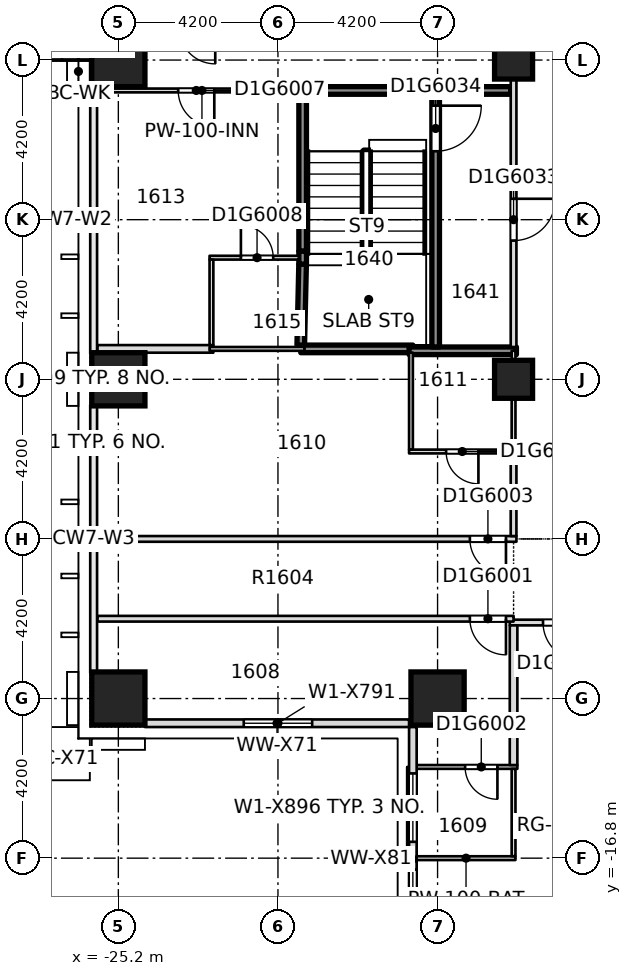
"""IFC4 building model, lengths in metres.
Left out: names, types, materials, properties, quantities, classifications, styles, units other than length and angle.
Written with IfcOpenShell. Run it as: python <this file> out.ifc"""

import sys

from ifc_helpers import new_model, si_unit, direction, frame, frame_2d, origin, origin_2d, place, context, subcontext, project, spatial, rectangle, extrude, element, fill, save


model = new_model("IFC4")
c1 = context("Model", 3, precision=1e-05, world=origin(), true_north=direction((0.0, 1.0)))
c2 = subcontext(c1, "Body", "Model", "MODEL_VIEW")
j1 = project(units=[si_unit("LENGTHUNIT", "METRE"), si_unit("PLANEANGLEUNIT", "RADIAN")], contexts=[c1])
p1 = place(None, origin())
s1 = spatial("IfcSite", under=j1, at=p1, CompositionType="ELEMENT")
p2 = place(p1, origin())
s2 = spatial("IfcBuilding", under=s1, at=p2, CompositionType="ELEMENT")
p3 = place(p2, frame((0.0, 0.0, 69.0)))
s3 = spatial("IfcBuildingStorey", under=s2, at=p3, CompositionType="ELEMENT", Elevation=69.0)
for number, where, z_axis, x_axis in (
    (1, (-25.2, -12.6, -0.32), (0.0, 0.0, 1.0), (1.0, 0.0, 0.0)),
    (2, (-16.8, -12.6, -0.32), (0.0, 0.0, 1.0), (1.0, 0.0, 0.0)),
    (3, (-25.2, -4.2, -0.32), (0.0, 0.0, 1.0), (1.0, 0.0, 0.0)),
    (4, (-25.2, 4.2, -0.32), (0.0, 0.0, 1.0), (1.0, 0.0, 0.0)),
):
    element("IfcColumn", number, at=place(p3, frame(where, z_axis=z_axis, x_axis=x_axis)), inside=s3, PredefinedType="COLUMN", context=c2, shape_type="SweptSolid", body=[
        extrude(rectangle(XDim=1.4, YDim=1.4, at=origin_2d()), origin(), (0.0, 0.0, 1.0), 3.45),
    ])
for number, where, z_axis, x_axis in (
    (5, (-14.8, -4.2, -0.32), (0.0, 0.0, 1.0), (1.0, 0.0, 0.0)),
    (6, (-14.8, 4.2, -0.32), (0.0, 0.0, 1.0), (1.0, 0.0, 0.0)),
):
    element("IfcColumn", number, at=place(p3, frame(where, z_axis=z_axis, x_axis=x_axis)), inside=s3, PredefinedType="COLUMN", context=c2, shape_type="SweptSolid", body=[
        extrude(rectangle(XDim=1.0, YDim=1.0, at=origin_2d()), origin(), (0.0, 0.0, 1.0), 3.45),
    ])
p4 = place(p3, frame((-17.35, -16.8, 0.0), z_axis=(0.0, 0.0, 1.0), x_axis=(1.0, 0.0, 0.0)))
e7 = element("IfcWall", 7, at=p4, inside=s3, PredefinedType="PARTITIONING", context=c2, shape_type="SweptSolid", body=[
    extrude(rectangle(XDim=2.598, YDim=0.1, at=frame_2d((1.299, 0.0))), origin(), (0.0, 0.0, 1.0), 3.13),
])
p5 = place(p3, frame((-17.35, -14.4, 0.0), z_axis=(0.0, 0.0, 1.0), x_axis=(1.0, 0.0, 0.0)))
e8 = element("IfcWall", 8, at=p5, inside=s3, PredefinedType="PARTITIONING", context=c2, shape_type="SweptSolid", body=[
    extrude(rectangle(XDim=2.65, YDim=0.1, at=frame_2d((1.325, 0.0))), origin(), (0.0, 0.0, 1.0), 3.13),
])
p6 = place(p5, frame((1.275, 0.0, 0.0)))
e9 = element("IfcOpeningElement", 9, at=p6, cuts=e8, PredefinedType="OPENING", context=c2, shape_type="SweptSolid", body=[
    extrude(rectangle(XDim=0.85, YDim=2.1, at=frame_2d((0.425, 1.05))), frame((0.0, 0.06, 0.0), z_axis=(0.0, -1.0, 0.0), x_axis=(1.0, 0.0, 0.0)), (0.0, 0.0, 1.0), 0.12),
])
p7 = place(p3, frame((-14.9, -10.6, 0.0), z_axis=(0.0, 0.0, 1.0), x_axis=(1.0, 0.0, 0.0)))
e10 = element("IfcWall", 10, at=p7, inside=s3, PredefinedType="PARTITIONING", context=c2, shape_type="SweptSolid", body=[
    extrude(rectangle(XDim=6.4, YDim=0.15, at=frame_2d((3.2, 0.0))), origin(), (0.0, 0.0, 1.0), 3.13),
])
p8 = place(p7, frame((3.95, 0.0, 0.0)))
e11 = element("IfcOpeningElement", 11, at=p8, cuts=e10, PredefinedType="OPENING", context=c2, shape_type="SweptSolid", body=[
    extrude(rectangle(XDim=1.1, YDim=2.1, at=frame_2d((0.55, 1.05))), frame((0.0, 0.085, 0.0), z_axis=(0.0, -1.0, 0.0), x_axis=(1.0, 0.0, 0.0)), (0.0, 0.0, 1.0), 0.17),
])
p9 = place(p7, frame((0.875, 0.0, 0.0)))
e12 = element("IfcOpeningElement", 12, at=p9, cuts=e10, PredefinedType="OPENING", context=c2, shape_type="SweptSolid", body=[
    extrude(rectangle(XDim=1.0, YDim=2.1, at=frame_2d((0.5, 1.05))), frame((0.0, 0.085, 0.0), z_axis=(0.0, -1.0, 0.0), x_axis=(1.0, 0.0, 0.0)), (0.0, 0.0, 1.0), 0.17),
])
p10 = place(p3, frame((-25.75, -10.5, 0.0), z_axis=(0.0, 0.0, 1.0), x_axis=(1.0, 0.0, 0.0)))
e13 = element("IfcWall", 13, at=p10, inside=s3, PredefinedType="PARTITIONING", context=c2, shape_type="SweptSolid", body=[
    extrude(rectangle(XDim=10.95, YDim=0.15, at=frame_2d((5.475, 0.0))), origin(), (0.0, 0.0, 1.0), 3.13),
])
p11 = place(p10, frame((9.8, 0.0, 0.0)))
e14 = element("IfcOpeningElement", 14, at=p11, cuts=e13, PredefinedType="OPENING", context=c2, shape_type="SweptSolid", body=[
    extrude(rectangle(XDim=0.95, YDim=2.1, at=frame_2d((0.475, 1.05))), frame((0.0, 0.085, 0.0), z_axis=(0.0, -1.0, 0.0), x_axis=(1.0, 0.0, 0.0)), (0.0, 0.0, 1.0), 0.17),
])
p12 = place(p3, frame((-25.75, -8.4, 0.0), z_axis=(0.0, 0.0, 1.0), x_axis=(1.0, 0.0, 0.0)))
e15 = element("IfcWall", 15, at=p12, inside=s3, PredefinedType="PARTITIONING", context=c2, shape_type="SweptSolid", body=[
    extrude(rectangle(XDim=11.025, YDim=0.15, at=frame_2d((5.512, 0.0))), origin(), (0.0, 0.0, 1.0), 3.13),
])
p13 = place(p12, frame((9.8, 0.0, 0.0)))
e16 = element("IfcOpeningElement", 16, at=p13, cuts=e15, PredefinedType="OPENING", context=c2, shape_type="SweptSolid", body=[
    extrude(rectangle(XDim=0.95, YDim=2.1, at=frame_2d((0.475, 1.05))), frame((0.0, 0.085, 0.0), z_axis=(0.0, -1.0, 0.0), x_axis=(1.0, 0.0, 0.0)), (0.0, 0.0, 1.0), 0.17),
])
p14 = place(p3, frame((-17.55, -6.1, 0.0), z_axis=(0.0, 0.0, 1.0), x_axis=(1.0, 0.0, 0.0)))
e17 = element("IfcWall", 17, at=p14, inside=s3, PredefinedType="PARTITIONING", context=c2, shape_type="SweptSolid", body=[
    extrude(rectangle(XDim=2.825, YDim=0.1, at=frame_2d((1.413, 0.0))), origin(), (0.0, 0.0, 1.0), 3.13),
])
p15 = place(p14, frame((0.975, 0.0, 0.0)))
e18 = element("IfcOpeningElement", 18, at=p15, cuts=e17, PredefinedType="OPENING", context=c2, shape_type="SweptSolid", body=[
    extrude(rectangle(XDim=0.85, YDim=2.1, at=frame_2d((0.425, 1.05))), frame((0.0, 0.06, 0.0), z_axis=(0.0, -1.0, 0.0), x_axis=(1.0, 0.0, 0.0)), (0.0, 0.0, 1.0), 0.12),
])
p16 = place(p3, frame((-25.75, -3.4, 0.0), z_axis=(0.0, 0.0, 1.0), x_axis=(1.0, 0.0, 0.0)))
e19 = element("IfcWall", 19, at=p16, inside=s3, PredefinedType="PARTITIONING", context=c2, shape_type="SweptSolid", body=[
    extrude(rectangle(XDim=3.05, YDim=0.2, at=frame_2d((1.525, 0.0))), origin(), (0.0, 0.0, 1.0), 3.13),
])
p17 = place(p3, frame((-22.8, -3.4, 0.0), z_axis=(0.0, 0.0, 1.0), x_axis=(1.0, 0.0, 0.0)))
e20 = element("IfcWall", 20, at=p17, inside=s3, PredefinedType="PARTITIONING", context=c2, shape_type="SweptSolid", body=[
    extrude(rectangle(XDim=2.5, YDim=0.1, at=frame_2d((1.25, 0.0))), origin(), (0.0, 0.0, 1.0), 3.13),
])
p18 = place(p3, frame((-20.4, -3.4, 0.0), z_axis=(0.0, 0.0, 1.0), x_axis=(1.0, 0.0, 0.0)))
e21 = element("IfcWall", 21, at=p18, inside=s3, PredefinedType="SOLIDWALL", context=c2, shape_type="SweptSolid", body=[
    extrude(rectangle(XDim=2.95, YDim=0.2, at=frame_2d((1.475, 0.0))), origin(), (0.0, 0.0, 1.0), 3.13),
])
p19 = place(p3, frame((-17.55, -3.45, 0.0), z_axis=(0.0, 0.0, 1.0), x_axis=(1.0, 0.0, 0.0)))
e22 = element("IfcWall", 22, at=p19, inside=s3, PredefinedType="SOLIDWALL", context=c2, shape_type="SweptSolid", body=[
    extrude(rectangle(XDim=2.825, YDim=0.2, at=frame_2d((1.413, 0.0))), origin(), (0.0, 0.0, 1.0), 3.13),
])
p20 = place(p3, frame((-22.8, -1.0, 0.0), z_axis=(0.0, 0.0, 1.0), x_axis=(1.0, 0.0, 0.0)))
e23 = element("IfcWall", 23, at=p20, inside=s3, PredefinedType="PARTITIONING", context=c2, shape_type="SweptSolid", body=[
    extrude(rectangle(XDim=2.35, YDim=0.1, at=frame_2d((1.175, 0.0))), origin(), (0.0, 0.0, 1.0), 3.13),
])
p21 = place(p20, frame((0.825, 0.0, 0.0)))
e24 = element("IfcOpeningElement", 24, at=p21, cuts=e23, PredefinedType="OPENING", context=c2, shape_type="SweptSolid", body=[
    extrude(rectangle(XDim=0.85, YDim=2.1, at=frame_2d((0.425, 1.05))), frame((0.0, 0.06, 0.0), z_axis=(0.0, -1.0, 0.0), x_axis=(1.0, 0.0, 0.0)), (0.0, 0.0, 1.0), 0.12),
])
p22 = place(p3, frame((-25.75, 3.4, 0.0), z_axis=(0.0, 0.0, 1.0), x_axis=(1.0, 0.0, 0.0)))
e25 = element("IfcWall", 25, at=p22, inside=s3, PredefinedType="PARTITIONING", context=c2, shape_type="SweptSolid", body=[
    extrude(rectangle(XDim=5.5, YDim=0.1, at=frame_2d((2.75, 0.0))), origin(), (0.0, 0.0, 1.0), 3.13),
])
p23 = place(p22, frame((2.125, 0.0, 0.0)))
e26 = element("IfcOpeningElement", 26, at=p23, cuts=e25, PredefinedType="OPENING", context=c2, shape_type="SweptSolid", body=[
    extrude(rectangle(XDim=0.95, YDim=2.1, at=frame_2d((0.475, 1.05))), frame((0.0, 0.06, 0.0), z_axis=(0.0, -1.0, 0.0), x_axis=(1.0, 0.0, 0.0)), (0.0, 0.0, 1.0), 0.12),
])
p24 = place(p3, frame((-20.45, 3.4, 0.0), z_axis=(0.0, 0.0, 1.0), x_axis=(1.0, 0.0, 0.0)))
e27 = element("IfcWall", 27, at=p24, inside=s3, PredefinedType="SOLIDWALL", context=c2, shape_type="SweptSolid", body=[
    extrude(rectangle(XDim=5.575, YDim=0.2, at=frame_2d((2.788, 0.0))), origin(), (0.0, 0.0, 1.0), 3.13),
])
p25 = place(p3, frame((-22.75, -3.3, 0.0), z_axis=(0.0, 0.0, 1.0), x_axis=(0.0, 1.0, 0.0)))
e28 = element("IfcWall", 28, at=p25, inside=s3, PredefinedType="PARTITIONING", context=c2, shape_type="SweptSolid", body=[
    extrude(rectangle(XDim=2.25, YDim=0.1, at=frame_2d((1.125, 0.0))), origin(), (0.0, 0.0, 1.0), 3.13),
])
p26 = place(p3, frame((-20.4, -3.3, 0.0), z_axis=(0.0, 0.0, 1.0), x_axis=(0.022687568549, 0.99974260399, 0.0)))
e29 = element("IfcWall", 29, at=p26, inside=s3, PredefinedType="SOLIDWALL", context=c2, shape_type="SweptSolid", body=[
    extrude(rectangle(XDim=2.131, YDim=0.2, at=frame_2d((1.065, 0.0))), origin(), (0.0, 0.0, 1.0), 3.13),
])
p27 = place(p3, frame((-20.35, -0.83, 0.0), z_axis=(0.0, 0.0, 1.0), x_axis=(0.0, 1.0, 0.0)))
e30 = element("IfcWall", 30, at=p27, inside=s3, PredefinedType="SOLIDWALL", context=c2, shape_type="SweptSolid", body=[
    extrude(rectangle(XDim=4.13, YDim=0.2, at=frame_2d((2.065, 0.0))), origin(), (0.0, 0.0, 1.0), 3.13),
])
p28 = place(p3, frame((-17.55, -16.75, 0.0), z_axis=(0.0, 0.0, 1.0), x_axis=(0.0, 1.0, 0.0)))
e31 = element("IfcWall", 31, at=p28, inside=s3, PredefinedType="PARTITIONING", context=c2, shape_type="SweptSolid", body=[
    extrude(rectangle(XDim=2.35, YDim=0.1, at=frame_2d((1.175, 0.0))), origin(), (0.0, 0.0, 1.0), 3.13),
])
p29 = place(p3, frame((-17.5, -6.05, 0.0), z_axis=(0.0, 0.0, 1.0), x_axis=(0.0, 1.0, 0.0)))
e32 = element("IfcWall", 32, at=p29, inside=s3, PredefinedType="PARTITIONING", context=c2, shape_type="SweptSolid", body=[
    extrude(rectangle(XDim=2.55, YDim=0.1, at=frame_2d((1.275, 0.0))), origin(), (0.0, 0.0, 1.0), 3.13),
])
p30 = place(p3, frame((-16.85, -3.35, 0.0), z_axis=(0.0, 0.0, 1.0), x_axis=(0.0, 1.0, 0.0)))
e33 = element("IfcWall", 33, at=p30, inside=s3, PredefinedType="SOLIDWALL", context=c2, shape_type="SweptSolid", body=[
    extrude(rectangle(XDim=6.65, YDim=0.2, at=frame_2d((3.325, 0.0))), origin(), (0.0, 0.0, 1.0), 3.13),
])
p31 = place(p30, frame((5.15, 0.0, 0.0)))
e34 = element("IfcOpeningElement", 34, at=p31, cuts=e33, PredefinedType="OPENING", context=c2, shape_type="SweptSolid", body=[
    extrude(rectangle(XDim=1.2, YDim=2.1, at=frame_2d((0.6, 1.05))), frame((0.0, 0.11, 0.0), z_axis=(0.0, -1.0, 0.0), x_axis=(1.0, 0.0, 0.0)), (0.0, 0.0, 1.0), 0.22),
])
p32 = place(p3, frame((-14.8, -16.748, 0.0), z_axis=(0.0, 0.0, 1.0), x_axis=(0.0, 1.0, 0.0)))
e35 = element("IfcWall", 35, at=p32, inside=s3, PredefinedType="PARTITIONING", context=c2, shape_type="SweptSolid", body=[
    extrude(rectangle(XDim=2.298, YDim=0.1, at=frame_2d((1.149, 0.0))), origin(), (0.0, 0.0, 1.0), 3.13),
])
p33 = place(p3, frame((-14.8, -14.35, 0.0), z_axis=(0.0, 0.0, 1.0), x_axis=(0.0, 1.0, 0.0)))
e36 = element("IfcWall", 36, at=p33, inside=s3, PredefinedType="PARTITIONING", context=c2, shape_type="SweptSolid", body=[
    extrude(rectangle(XDim=3.675, YDim=0.2, at=frame_2d((1.837, 0.0))), origin(), (0.0, 0.0, 1.0), 3.13),
])
p34 = place(p3, frame((-14.8, -8.325, 0.0), z_axis=(0.0, 0.0, 1.0), x_axis=(0.0, 1.0, 0.0)))
e37 = element("IfcWall", 37, at=p34, inside=s3, PredefinedType="PARTITIONING", context=c2, shape_type="SweptSolid", body=[
    extrude(rectangle(XDim=2.175, YDim=0.15, at=frame_2d((1.087, 0.0))), origin(), (0.0, 0.0, 1.0), 3.13),
])
p35 = place(p3, frame((-14.8, -6.05, 0.0), z_axis=(0.0, 0.0, 1.0), x_axis=(0.0, 1.0, 0.0)))
e38 = element("IfcWall", 38, at=p35, inside=s3, PredefinedType="PARTITIONING", context=c2, shape_type="SweptSolid", body=[
    extrude(rectangle(XDim=2.6, YDim=0.1, at=frame_2d((1.3, 0.0))), origin(), (0.0, 0.0, 1.0), 3.13),
])
p36 = place(p3, frame((-14.8, -3.35, 0.0), z_axis=(0.0, 0.0, 1.0), x_axis=(0.0, 1.0, 0.0)))
e39 = element("IfcWall", 39, at=p36, inside=s3, PredefinedType="PARTITIONING", context=c2, shape_type="SweptSolid", body=[
    extrude(rectangle(XDim=13.775, YDim=0.15, at=frame_2d((6.888, 0.0))), origin(), (0.0, 0.0, 1.0), 3.13),
])
p37 = place(p36, frame((2.8, 0.0, 0.0)))
e40 = element("IfcOpeningElement", 40, at=p37, cuts=e39, PredefinedType="OPENING", context=c2, shape_type="SweptSolid", body=[
    extrude(rectangle(XDim=1.1, YDim=2.1, at=frame_2d((0.55, 1.05))), frame((0.0, 0.085, 0.0), z_axis=(0.0, -1.0, 0.0), x_axis=(1.0, 0.0, 0.0)), (0.0, 0.0, 1.0), 0.17),
])
p38 = place(p3, frame((-24.5, -13.25, 0.0), z_axis=(0.0, 0.0, 1.0), x_axis=(1.0, 0.0, 0.0)))
e41 = element("IfcWall", 41, at=p38, inside=s3, PredefinedType="STANDARD", context=c2, shape_type="SweptSolid", body=[
    extrude(rectangle(XDim=6.95, YDim=0.2, at=frame_2d((3.475, 0.0))), origin(), (0.0, 0.0, 1.0), 3.13),
])
p39 = place(p38, frame((2.6, 0.0, 0.2)))
e42 = element("IfcOpeningElement", 42, at=p39, cuts=e41, PredefinedType="OPENING", context=c2, shape_type="SweptSolid", body=[
    extrude(rectangle(XDim=1.8, YDim=2.65, at=frame_2d((0.9, 1.325))), frame((0.0, 0.11, 0.0), z_axis=(0.0, -1.0, 0.0), x_axis=(1.0, 0.0, 0.0)), (0.0, 0.0, 1.0), 0.22),
])
p40 = place(p3, frame((-17.45, -13.35, 0.0), z_axis=(0.0, 0.0, 1.0), x_axis=(0.0, -1.0, 0.0)))
e43 = element("IfcWall", 43, at=p40, inside=s3, PredefinedType="STANDARD", context=c2, shape_type="SweptSolid", body=[
    extrude(rectangle(XDim=6.95, YDim=0.2, at=frame_2d((3.475, 0.0))), origin(), (0.0, 0.0, 1.0), 3.13),
])
p41 = place(p40, frame((3.75, 0.0, 0.2)))
e44 = element("IfcOpeningElement", 44, at=p41, cuts=e43, PredefinedType="OPENING", context=c2, shape_type="SweptSolid", body=[
    extrude(rectangle(XDim=1.8, YDim=2.65, at=frame_2d((0.9, 1.325))), frame((0.0, 0.11, 0.0), z_axis=(0.0, -1.0, 0.0), x_axis=(1.0, 0.0, 0.0)), (0.0, 0.0, 1.0), 0.22),
])
p42 = place(p40, frame((1.22, 0.0, 0.2)))
e45 = element("IfcOpeningElement", 45, at=p42, cuts=e43, PredefinedType="OPENING", context=c2, shape_type="SweptSolid", body=[
    extrude(rectangle(XDim=1.8, YDim=2.65, at=frame_2d((0.9, 1.325))), frame((0.0, 0.11, 0.0), z_axis=(0.0, -1.0, 0.0), x_axis=(1.0, 0.0, 0.0)), (0.0, 0.0, 1.0), 0.22),
])
p43 = place(p3, frame((-20.35, -1.17, 0.0), z_axis=(0.0, 0.0, 1.0), x_axis=(0.0, 1.0, 0.0)))
e46 = element("IfcWall", 46, at=p43, inside=s3, PredefinedType="SOLIDWALL", context=c2, shape_type="SweptSolid", body=[
    extrude(rectangle(XDim=0.34, YDim=0.2, at=frame_2d((0.17, 0.0))), origin(), (0.0, 0.0, 1.0), 3.13),
])
p44 = place(p11, origin())
e47 = element("IfcDoor", 47, at=p44, inside=s3, OperationType="SINGLE_SWING_RIGHT", PredefinedType="DOOR", context=c2, shape_type="SweptSolid", body=[
    extrude(rectangle(XDim=0.95, YDim=2.1, at=frame_2d((0.475, 1.05))), frame((0.0, 0.025, 0.0), z_axis=(0.0, -1.0, 0.0), x_axis=(1.0, 0.0, 0.0)), (0.0, 0.0, 1.0), 0.05),
])
fill(e14, e47)
p45 = place(p6, origin())
e48 = element("IfcDoor", 48, at=p45, inside=s3, OperationType="SINGLE_SWING_RIGHT", PredefinedType="DOOR", context=c2, shape_type="SweptSolid", body=[
    extrude(rectangle(XDim=0.85, YDim=2.1, at=frame_2d((0.425, 1.05))), frame((0.0, 0.025, 0.0), z_axis=(0.0, -1.0, 0.0), x_axis=(1.0, 0.0, 0.0)), (0.0, 0.0, 1.0), 0.05),
])
fill(e9, e48)
p46 = place(p13, origin())
e49 = element("IfcDoor", 49, at=p46, inside=s3, OperationType="SINGLE_SWING_LEFT", PredefinedType="DOOR", context=c2, shape_type="SweptSolid", body=[
    extrude(rectangle(XDim=0.95, YDim=2.1, at=frame_2d((0.475, 1.05))), frame((0.0, 0.025, 0.0), z_axis=(0.0, -1.0, 0.0), x_axis=(1.0, 0.0, 0.0)), (0.0, 0.0, 1.0), 0.05),
])
fill(e16, e49)
p47 = place(p15, origin())
e50 = element("IfcDoor", 50, at=p47, inside=s3, OperationType="SINGLE_SWING_LEFT", PredefinedType="DOOR", context=c2, shape_type="SweptSolid", body=[
    extrude(rectangle(XDim=0.85, YDim=2.1, at=frame_2d((0.425, 1.05))), frame((0.0, 0.025, 0.0), z_axis=(0.0, -1.0, 0.0), x_axis=(1.0, 0.0, 0.0)), (0.0, 0.0, 1.0), 0.05),
])
fill(e18, e50)
p48 = place(p23, origin())
e51 = element("IfcDoor", 51, at=p48, inside=s3, OperationType="SINGLE_SWING_LEFT", PredefinedType="DOOR", context=c2, shape_type="SweptSolid", body=[
    extrude(rectangle(XDim=0.95, YDim=2.1, at=frame_2d((0.475, 1.05))), frame((0.0, 0.025, 0.0), z_axis=(0.0, -1.0, 0.0), x_axis=(1.0, 0.0, 0.0)), (0.0, 0.0, 1.0), 0.05),
])
fill(e26, e51)
p49 = place(p21, origin())
e52 = element("IfcDoor", 52, at=p49, inside=s3, OperationType="SINGLE_SWING_RIGHT", PredefinedType="DOOR", context=c2, shape_type="SweptSolid", body=[
    extrude(rectangle(XDim=0.85, YDim=2.1, at=frame_2d((0.425, 1.05))), frame((0.0, 0.025, 0.0), z_axis=(0.0, -1.0, 0.0), x_axis=(1.0, 0.0, 0.0)), (0.0, 0.0, 1.0), 0.05),
])
fill(e24, e52)
p50 = place(p37, origin())
e53 = element("IfcDoor", 53, at=p50, inside=s3, OperationType="SINGLE_SWING_RIGHT", PredefinedType="DOOR", context=c2, shape_type="SweptSolid", body=[
    extrude(rectangle(XDim=1.1, YDim=2.1, at=frame_2d((0.55, 1.05))), frame((0.0, 0.025, 0.0), z_axis=(0.0, -1.0, 0.0), x_axis=(1.0, 0.0, 0.0)), (0.0, 0.0, 1.0), 0.05),
])
fill(e40, e53)
p51 = place(p31, origin())
e54 = element("IfcDoor", 54, at=p51, inside=s3, OperationType="SINGLE_SWING_RIGHT", PredefinedType="DOOR", context=c2, shape_type="SweptSolid", body=[
    extrude(rectangle(XDim=1.2, YDim=2.1, at=frame_2d((0.6, 1.05))), frame((0.0, 0.025, 0.0), z_axis=(0.0, -1.0, 0.0), x_axis=(1.0, 0.0, 0.0)), (0.0, 0.0, 1.0), 0.05),
])
fill(e34, e54)
p52 = place(p9, origin())
e55 = element("IfcDoor", 55, at=p52, inside=s3, OperationType="SINGLE_SWING_RIGHT", PredefinedType="DOOR", context=c2, shape_type="SweptSolid", body=[
    extrude(rectangle(XDim=1.0, YDim=2.1, at=frame_2d((0.5, 1.05))), frame((0.0, 0.025, 0.0), z_axis=(0.0, -1.0, 0.0), x_axis=(1.0, 0.0, 0.0)), (0.0, 0.0, 1.0), 0.05),
])
fill(e12, e55)
p53 = place(p41, origin())
e56 = element("IfcWindow", 56, at=p53, inside=s3, PartitioningType="SINGLE_PANEL", PredefinedType="WINDOW", context=c2, shape_type="SweptSolid", body=[
    extrude(rectangle(XDim=1.8, YDim=2.65, at=frame_2d((0.9, 1.325))), frame((0.0, 0.03, 0.0), z_axis=(0.0, -1.0, 0.0), x_axis=(1.0, 0.0, 0.0)), (0.0, 0.0, 1.0), 0.06),
])
fill(e44, e56)
p54 = place(p42, origin())
e57 = element("IfcWindow", 57, at=p54, inside=s3, PartitioningType="SINGLE_PANEL", PredefinedType="WINDOW", context=c2, shape_type="SweptSolid", body=[
    extrude(rectangle(XDim=1.8, YDim=2.65, at=frame_2d((0.9, 1.325))), frame((0.0, 0.03, 0.0), z_axis=(0.0, -1.0, 0.0), x_axis=(1.0, 0.0, 0.0)), (0.0, 0.0, 1.0), 0.06),
])
fill(e45, e57)
p55 = place(p39, origin())
e58 = element("IfcWindow", 58, at=p55, inside=s3, PartitioningType="SINGLE_PANEL", PredefinedType="WINDOW", context=c2, shape_type="SweptSolid", body=[
    extrude(rectangle(XDim=1.8, YDim=2.65, at=frame_2d((0.9, 1.325))), frame((0.0, 0.03, 0.0), z_axis=(0.0, -1.0, 0.0), x_axis=(1.0, 0.0, 0.0)), (0.0, 0.0, 1.0), 0.06),
])
fill(e42, e58)
save(model, sys.argv[1])
